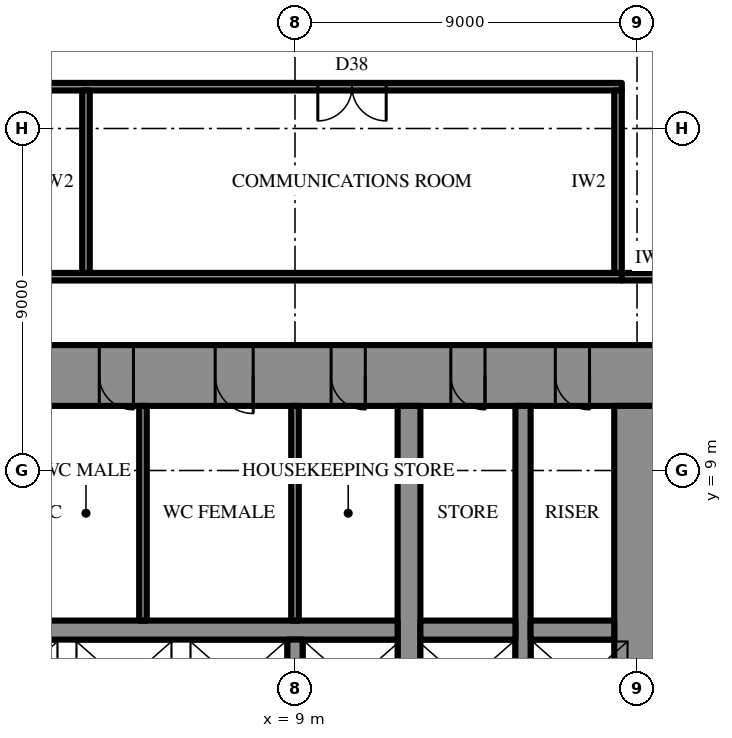
"""IFC4 building model, lengths in metres.
Left out: names, types, materials, properties, quantities, classifications, styles, units other than length and angle.
Written with IfcOpenShell. Run it as: python <this file> out.ifc"""

import sys

from ifc_helpers import new_model, si_unit, direction, frame, frame_2d, origin, place, context, subcontext, project, spatial, rectangle, extrude, element, fill, save


model = new_model("IFC4")
c1 = context("Model", 3, precision=1e-05, world=origin(), true_north=direction((0.0, 1.0)))
c2 = subcontext(c1, "Body", "Model", "MODEL_VIEW")
j1 = project(units=[si_unit("LENGTHUNIT", "METRE"), si_unit("PLANEANGLEUNIT", "RADIAN")], contexts=[c1])
p1 = place(None, origin())
s1 = spatial("IfcSite", under=j1, at=p1, CompositionType="ELEMENT")
p2 = place(p1, origin())
s2 = spatial("IfcBuilding", under=s1, at=p2, CompositionType="ELEMENT")
p3 = place(p2, frame((0.0, 0.0, 48.7)))
s3 = spatial("IfcBuildingStorey", under=s2, at=p3, CompositionType="ELEMENT", Elevation=48.7)
p4 = place(p3, frame((-18.6, 11.5, 0.0), z_axis=(0.0, 0.0, 1.0), x_axis=(1.0, 0.0, 0.0)))
e1 = element("IfcWall", 1, at=p4, inside=s3, PredefinedType="SHEAR", context=c2, shape_type="SweptSolid", body=[
    extrude(rectangle(XDim=37.2, YDim=1.6, at=frame_2d((18.6, 0.0))), origin(), (0.0, 0.0, 1.0), 4.2),
])
p5 = place(p4, frame((19.45, 0.0, 0.0)))
e2 = element("IfcOpeningElement", 2, at=p5, cuts=e1, PredefinedType="OPENING", context=c2, shape_type="SweptSolid", body=[
    extrude(rectangle(XDim=0.9, YDim=2.2, at=frame_2d((0.45, 1.1))), frame((0.0, 0.81, 0.0), z_axis=(0.0, -1.0, 0.0), x_axis=(1.0, 0.0, 0.0)), (0.0, 0.0, 1.0), 1.62),
])
p6 = place(p4, frame((22.45, 0.0, 0.0)))
e3 = element("IfcOpeningElement", 3, at=p6, cuts=e1, PredefinedType="OPENING", context=c2, shape_type="SweptSolid", body=[
    extrude(rectangle(XDim=0.9, YDim=2.2, at=frame_2d((0.45, 1.1))), frame((0.0, 0.81, 0.0), z_axis=(0.0, -1.0, 0.0), x_axis=(1.0, 0.0, 0.0)), (0.0, 0.0, 1.0), 1.62),
])
p7 = place(p4, frame((25.5, 0.0, 0.0)))
e4 = element("IfcOpeningElement", 4, at=p7, cuts=e1, PredefinedType="OPENING", context=c2, shape_type="SweptSolid", body=[
    extrude(rectangle(XDim=1.0, YDim=2.2, at=frame_2d((0.5, 1.1))), frame((0.0, 0.81, 0.0), z_axis=(0.0, -1.0, 0.0), x_axis=(1.0, 0.0, 0.0)), (0.0, 0.0, 1.0), 1.62),
])
p8 = place(p4, frame((1.85, 0.0, 0.0)))
e5 = element("IfcOpeningElement", 5, at=p8, cuts=e1, PredefinedType="OPENING", context=c2, shape_type="SweptSolid", body=[
    extrude(rectangle(XDim=0.9, YDim=2.2, at=frame_2d((0.45, 1.1))), frame((0.0, 0.81, 0.0), z_axis=(0.0, -1.0, 0.0), x_axis=(1.0, 0.0, 0.0)), (0.0, 0.0, 1.0), 1.62),
])
p9 = place(p4, frame((4.6, 0.0, 0.0)))
e6 = element("IfcOpeningElement", 6, at=p9, cuts=e1, PredefinedType="OPENING", context=c2, shape_type="SweptSolid", body=[
    extrude(rectangle(XDim=0.9, YDim=2.2, at=frame_2d((0.45, 1.1))), frame((0.0, 0.81, 0.0), z_axis=(0.0, -1.0, 0.0), x_axis=(1.0, 0.0, 0.0)), (0.0, 0.0, 1.0), 1.62),
])
p10 = place(p4, frame((7.75, 0.0, 0.0)))
e7 = element("IfcOpeningElement", 7, at=p10, cuts=e1, PredefinedType="OPENING", context=c2, shape_type="SweptSolid", body=[
    extrude(rectangle(XDim=0.9, YDim=2.2, at=frame_2d((0.45, 1.1))), frame((0.0, 0.81, 0.0), z_axis=(0.0, -1.0, 0.0), x_axis=(1.0, 0.0, 0.0)), (0.0, 0.0, 1.0), 1.62),
])
p11 = place(p4, frame((28.55, 0.0, 0.0)))
e8 = element("IfcOpeningElement", 8, at=p11, cuts=e1, PredefinedType="OPENING", context=c2, shape_type="SweptSolid", body=[
    extrude(rectangle(XDim=0.9, YDim=2.2, at=frame_2d((0.45, 1.1))), frame((0.0, 0.81, 0.0), z_axis=(0.0, -1.0, 0.0), x_axis=(1.0, 0.0, 0.0)), (0.0, 0.0, 1.0), 1.62),
])
p12 = place(p4, frame((31.7, 0.0, 0.0)))
e9 = element("IfcOpeningElement", 9, at=p12, cuts=e1, PredefinedType="OPENING", context=c2, shape_type="SweptSolid", body=[
    extrude(rectangle(XDim=0.9, YDim=2.2, at=frame_2d((0.45, 1.1))), frame((0.0, 0.81, 0.0), z_axis=(0.0, -1.0, 0.0), x_axis=(1.0, 0.0, 0.0)), (0.0, 0.0, 1.0), 1.62),
])
p13 = place(p4, frame((34.45, 0.0, 0.0)))
e10 = element("IfcOpeningElement", 10, at=p13, cuts=e1, PredefinedType="OPENING", context=c2, shape_type="SweptSolid", body=[
    extrude(rectangle(XDim=0.9, YDim=2.2, at=frame_2d((0.45, 1.1))), frame((0.0, 0.81, 0.0), z_axis=(0.0, -1.0, 0.0), x_axis=(1.0, 0.0, 0.0)), (0.0, 0.0, 1.0), 1.62),
])
p14 = place(p3, frame((18.0, -10.7, 0.0), z_axis=(0.0, 0.0, 1.0), x_axis=(0.0, 1.0, 0.0)))
e11 = element("IfcWall", 11, at=p14, inside=s3, PredefinedType="SHEAR", context=c2, shape_type="SweptSolid", body=[
    extrude(rectangle(XDim=21.4, YDim=1.2, at=frame_2d((10.7, 0.0))), origin(), (0.0, 0.0, 1.0), 4.2),
])
p15 = place(p14, frame((9.8, 0.0, 0.0)))
e12 = element("IfcOpeningElement", 12, at=p15, cuts=e11, PredefinedType="OPENING", context=c2, shape_type="SweptSolid", body=[
    extrude(rectangle(XDim=1.8, YDim=2.4, at=frame_2d((0.9, 1.2))), frame((0.0, 0.61, 0.0), z_axis=(0.0, -1.0, 0.0), x_axis=(1.0, 0.0, 0.0)), (0.0, 0.0, 1.0), 1.22),
])
p16 = place(p3, frame((12.0, -10.7, 0.0), z_axis=(0.0, 0.0, 1.0), x_axis=(0.0, 1.0, 0.0)))
e13 = element("IfcWall", 13, at=p16, inside=s3, PredefinedType="SHEAR", context=c2, shape_type="SweptSolid", body=[
    extrude(rectangle(XDim=21.4, YDim=0.6, at=frame_2d((10.7, 0.0))), origin(), (0.0, 0.0, 1.0), 4.2),
])
p17 = place(p16, frame((9.8, 0.0, 0.0)))
e14 = element("IfcOpeningElement", 14, at=p17, cuts=e13, PredefinedType="OPENING", context=c2, shape_type="SweptSolid", body=[
    extrude(rectangle(XDim=1.8, YDim=2.4, at=frame_2d((0.9, 1.2))), frame((0.0, 0.31, 0.0), z_axis=(0.0, -1.0, 0.0), x_axis=(1.0, 0.0, 0.0)), (0.0, 0.0, 1.0), 0.62),
])
p18 = place(p3, frame((15.0, -10.7, 0.0), z_axis=(0.0, 0.0, 1.0), x_axis=(0.0, 1.0, 0.0)))
e15 = element("IfcWall", 15, at=p18, inside=s3, PredefinedType="SHEAR", context=c2, shape_type="SweptSolid", body=[
    extrude(rectangle(XDim=21.4, YDim=0.4, at=frame_2d((10.7, 0.0))), origin(), (0.0, 0.0, 1.0), 4.2),
])
p19 = place(p18, frame((9.8, 0.0, 0.0)))
e16 = element("IfcOpeningElement", 16, at=p19, cuts=e15, PredefinedType="OPENING", context=c2, shape_type="SweptSolid", body=[
    extrude(rectangle(XDim=1.8, YDim=2.4, at=frame_2d((0.9, 1.2))), frame((0.0, 0.21, 0.0), z_axis=(0.0, -1.0, 0.0), x_axis=(1.0, 0.0, 0.0)), (0.0, 0.0, 1.0), 0.42),
])
p20 = place(p3, frame((-11.7, 4.8, 0.0), z_axis=(0.0, 0.0, 1.0), x_axis=(1.0, 0.0, 0.0)))
e17 = element("IfcWall", 17, at=p20, inside=s3, PredefinedType="SHEAR", context=c2, shape_type="SweptSolid", body=[
    extrude(rectangle(XDim=23.4, YDim=0.5, at=frame_2d((11.7, 0.0))), origin(), (0.0, 0.0, 1.0), 4.2),
])
p21 = place(p20, frame((6.6, 0.0, 0.0)))
e18 = element("IfcOpeningElement", 18, at=p21, cuts=e17, PredefinedType="OPENING", context=c2, shape_type="SweptSolid", body=[
    extrude(rectangle(XDim=1.2, YDim=2.2, at=frame_2d((0.6, 1.1))), frame((0.0, 0.26, 0.0), z_axis=(0.0, -1.0, 0.0), x_axis=(1.0, 0.0, 0.0)), (0.0, 0.0, 1.0), 0.52),
])
p22 = place(p20, frame((3.6, 0.0, 0.0)))
e19 = element("IfcOpeningElement", 19, at=p22, cuts=e17, PredefinedType="OPENING", context=c2, shape_type="SweptSolid", body=[
    extrude(rectangle(XDim=1.2, YDim=2.2, at=frame_2d((0.6, 1.1))), frame((0.0, 0.26, 0.0), z_axis=(0.0, -1.0, 0.0), x_axis=(1.0, 0.0, 0.0)), (0.0, 0.0, 1.0), 0.52),
])
p23 = place(p3, frame((12.3, 4.8, 0.0), z_axis=(0.0, 0.0, 1.0), x_axis=(1.0, 0.0, 0.0)))
e20 = element("IfcWall", 20, at=p23, inside=s3, PredefinedType="SHEAR", context=c2, shape_type="SweptSolid", body=[
    extrude(rectangle(XDim=2.5, YDim=0.5, at=frame_2d((1.25, 0.0))), origin(), (0.0, 0.0, 1.0), 4.2),
])
p24 = place(p3, frame((15.2, 4.8, 0.0), z_axis=(0.0, 0.0, 1.0), x_axis=(1.0, 0.0, 0.0)))
e21 = element("IfcWall", 21, at=p24, inside=s3, PredefinedType="SHEAR", context=c2, shape_type="SweptSolid", body=[
    extrude(rectangle(XDim=2.2, YDim=0.5, at=frame_2d((1.1, 0.0))), origin(), (0.0, 0.0, 1.0), 4.2),
])
p25 = place(p3, frame((9.0, 2.25, 0.0), z_axis=(0.0, 0.0, 1.0), x_axis=(0.0, 1.0, 0.0)))
e22 = element("IfcWall", 22, at=p25, inside=s3, PredefinedType="SHEAR", context=c2, shape_type="SweptSolid", body=[
    extrude(rectangle(XDim=2.3, YDim=0.4, at=frame_2d((1.15, 0.0))), origin(), (0.0, 0.0, 1.0), 4.2),
])
for number, where, z_axis, x_axis in (
    (23, (9.0, 5.05, 0.0), (0.0, 0.0, 1.0), (0.0, 1.0, 0.0)),
    (24, (5.0, 5.05, 0.0), (0.0, 0.0, 1.0), (0.0, 1.0, 0.0)),
):
    element("IfcWall", number, at=place(p3, frame(where, z_axis=z_axis, x_axis=x_axis)), inside=s3, PredefinedType="PARTITIONING", context=c2, shape_type="SweptSolid", body=[
        extrude(rectangle(XDim=5.65, YDim=0.2, at=frame_2d((2.825, 0.0))), origin(), (0.0, 0.0, 1.0), 4.0),
    ])
p26 = place(p3, frame((-17.6, 14.1, 0.0), z_axis=(0.0, 0.0, 1.0), x_axis=(1.0, 0.0, 0.0)))
e25 = element("IfcWall", 25, at=p26, inside=s3, PredefinedType="PARTITIONING", context=c2, shape_type="SweptSolid", body=[
    extrude(rectangle(XDim=35.2, YDim=0.2, at=frame_2d((17.6, 0.0))), origin(), (0.0, 0.0, 1.0), 4.0),
])
p27 = place(p3, frame((-17.6, 19.1, 0.0), z_axis=(0.0, 0.0, 1.0), x_axis=(1.0, 0.0, 0.0)))
e26 = element("IfcWall", 26, at=p27, inside=s3, PredefinedType="PARTITIONING", context=c2, shape_type="SweptSolid", body=[
    extrude(rectangle(XDim=35.2, YDim=0.2, at=frame_2d((17.6, 0.0))), origin(), (0.0, 0.0, 1.0), 4.0),
])
p28 = place(p27, frame((9.7, 0.0, 0.0)))
e27 = element("IfcOpeningElement", 27, at=p28, cuts=e26, PredefinedType="OPENING", context=c2, shape_type="SweptSolid", body=[
    extrude(rectangle(XDim=1.8, YDim=2.4, at=frame_2d((0.9, 1.2))), frame((0.0, 0.11, 0.0), z_axis=(0.0, -1.0, 0.0), x_axis=(1.0, 0.0, 0.0)), (0.0, 0.0, 1.0), 0.22),
])
p29 = place(p27, frame((27.2, 0.0, 0.0)))
e28 = element("IfcOpeningElement", 28, at=p29, cuts=e26, PredefinedType="OPENING", context=c2, shape_type="SweptSolid", body=[
    extrude(rectangle(XDim=1.8, YDim=2.4, at=frame_2d((0.9, 1.2))), frame((0.0, 0.11, 0.0), z_axis=(0.0, -1.0, 0.0), x_axis=(1.0, 0.0, 0.0)), (0.0, 0.0, 1.0), 0.22),
])
for number, where, z_axis, x_axis in (
    (29, (3.5, 14.2, 0.0), (0.0, 0.0, 1.0), (0.0, 1.0, 0.0)),
    (30, (17.5, 14.2, 0.0), (0.0, 0.0, 1.0), (0.0, 1.0, 0.0)),
):
    element("IfcWall", number, at=place(p3, frame(where, z_axis=z_axis, x_axis=x_axis)), inside=s3, PredefinedType="PARTITIONING", context=c2, shape_type="SweptSolid", body=[
        extrude(rectangle(XDim=4.8, YDim=0.2, at=frame_2d((2.4, 0.0))), origin(), (0.0, 0.0, 1.0), 4.0),
    ])
p30 = place(p3, frame((17.6, 14.1, 0.0), z_axis=(0.0, 0.0, 1.0), x_axis=(1.0, 0.0, 0.0)))
e31 = element("IfcWall", 31, at=p30, inside=s3, PredefinedType="PARTITIONING", context=c2, shape_type="SweptSolid", body=[
    extrude(rectangle(XDim=1.6, YDim=0.2, at=frame_2d((0.8, 0.0))), origin(), (0.0, 0.0, 1.0), 4.0),
])
p31 = place(p6, frame((0.9, 0.0, 0.0), z_axis=(0.0, 0.0, 1.0), x_axis=(-1.0, 0.0, 0.0)))
e32 = element("IfcDoor", 32, at=p31, inside=s3, OperationType="SINGLE_SWING_RIGHT", PredefinedType="DOOR", context=c2, shape_type="SweptSolid", body=[
    extrude(rectangle(XDim=0.9, YDim=2.2, at=frame_2d((0.45, 1.1))), frame((0.0, 0.025, 0.0), z_axis=(0.0, -1.0, 0.0), x_axis=(1.0, 0.0, 0.0)), (0.0, 0.0, 1.0), 0.05),
])
fill(e3, e32)
p32 = place(p7, frame((1.0, 0.0, 0.0), z_axis=(0.0, 0.0, 1.0), x_axis=(-1.0, 0.0, 0.0)))
e33 = element("IfcDoor", 33, at=p32, inside=s3, OperationType="SINGLE_SWING_RIGHT", PredefinedType="DOOR", context=c2, shape_type="SweptSolid", body=[
    extrude(rectangle(XDim=1.0, YDim=2.2, at=frame_2d((0.5, 1.1))), frame((0.0, 0.025, 0.0), z_axis=(0.0, -1.0, 0.0), x_axis=(1.0, 0.0, 0.0)), (0.0, 0.0, 1.0), 0.05),
])
fill(e4, e33)
p33 = place(p11, frame((0.9, 0.0, 0.0), z_axis=(0.0, 0.0, 1.0), x_axis=(-1.0, 0.0, 0.0)))
e34 = element("IfcDoor", 34, at=p33, inside=s3, OperationType="SINGLE_SWING_RIGHT", PredefinedType="DOOR", context=c2, shape_type="SweptSolid", body=[
    extrude(rectangle(XDim=0.9, YDim=2.2, at=frame_2d((0.45, 1.1))), frame((0.0, 0.025, 0.0), z_axis=(0.0, -1.0, 0.0), x_axis=(1.0, 0.0, 0.0)), (0.0, 0.0, 1.0), 0.05),
])
fill(e8, e34)
p34 = place(p12, frame((0.9, 0.0, 0.0), z_axis=(0.0, 0.0, 1.0), x_axis=(-1.0, 0.0, 0.0)))
e35 = element("IfcDoor", 35, at=p34, inside=s3, OperationType="SINGLE_SWING_RIGHT", PredefinedType="DOOR", context=c2, shape_type="SweptSolid", body=[
    extrude(rectangle(XDim=0.9, YDim=2.2, at=frame_2d((0.45, 1.1))), frame((0.0, 0.025, 0.0), z_axis=(0.0, -1.0, 0.0), x_axis=(1.0, 0.0, 0.0)), (0.0, 0.0, 1.0), 0.05),
])
fill(e9, e35)
p35 = place(p13, frame((0.9, 0.0, 0.0), z_axis=(0.0, 0.0, 1.0), x_axis=(-1.0, 0.0, 0.0)))
e36 = element("IfcDoor", 36, at=p35, inside=s3, OperationType="SINGLE_SWING_RIGHT", PredefinedType="DOOR", context=c2, shape_type="SweptSolid", body=[
    extrude(rectangle(XDim=0.9, YDim=2.2, at=frame_2d((0.45, 1.1))), frame((0.0, 0.025, 0.0), z_axis=(0.0, -1.0, 0.0), x_axis=(1.0, 0.0, 0.0)), (0.0, 0.0, 1.0), 0.05),
])
fill(e10, e36)
p36 = place(p29, frame((1.8, 0.0, 0.0), z_axis=(0.0, 0.0, 1.0), x_axis=(-1.0, 0.0, 0.0)))
e37 = element("IfcDoor", 37, at=p36, inside=s3, OperationType="DOUBLE_DOOR_SINGLE_SWING", PredefinedType="DOOR", context=c2, shape_type="SweptSolid", body=[
    extrude(rectangle(XDim=1.8, YDim=2.4, at=frame_2d((0.9, 1.2))), frame((0.0, 0.025, 0.0), z_axis=(0.0, -1.0, 0.0), x_axis=(1.0, 0.0, 0.0)), (0.0, 0.0, 1.0), 0.05),
])
fill(e28, e37)
save(model, sys.argv[1])
